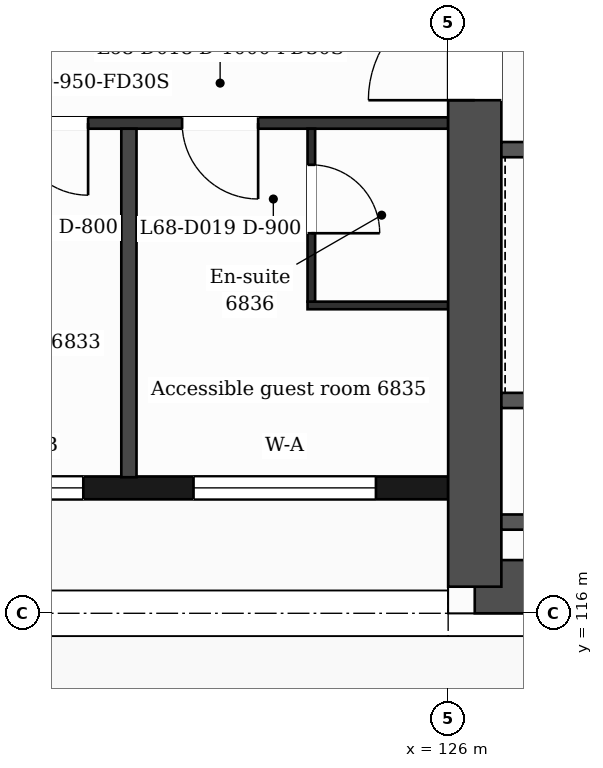
"""IFC4 building model, lengths in metres.
Left out: names, types, materials, properties, quantities, classifications, styles, units other than length and angle.
Written with IfcOpenShell. Run it as: python <this file> out.ifc"""

import sys

from ifc_helpers import new_model, si_unit, direction, frame, frame_2d, origin, place, context, subcontext, project, spatial, rectangle, extrude, element, fill, save


model = new_model("IFC4")
c1 = context("Model", 3, precision=1e-05, world=origin(), true_north=direction((0.0, 1.0)))
c2 = subcontext(c1, "Body", "Model", "MODEL_VIEW")
j1 = project(units=[si_unit("LENGTHUNIT", "METRE"), si_unit("PLANEANGLEUNIT", "RADIAN")], contexts=[c1])
p1 = place(None, origin())
s1 = spatial("IfcSite", under=j1, at=p1, CompositionType="ELEMENT")
p2 = place(p1, origin())
s2 = spatial("IfcBuilding", under=s1, at=p2, CompositionType="ELEMENT")
p3 = place(p2, frame((0.0, 0.0, 281.2)))
s3 = spatial("IfcBuildingStorey", under=s2, at=p3, CompositionType="ELEMENT", Elevation=281.2)
p4 = place(p3, frame((139.977, 116.35, 0.0), z_axis=(0.0, 0.0, 1.0), x_axis=(-1.0, 0.0, 0.0)))
e1 = element("IfcWall", 1, at=p4, inside=s3, PredefinedType="SHEAR", context=c2, shape_type="SweptSolid", body=[
    extrude(rectangle(XDim=13.626, YDim=0.7, at=frame_2d((6.813, 0.0))), origin(), (0.0, 0.0, 1.0), 3.7),
])
p5 = place(p3, frame((126.35, 116.35, 0.0), z_axis=(0.0, 0.0, 1.0), x_axis=(0.0, 1.0, 0.0)))
e2 = element("IfcWall", 2, at=p5, inside=s3, PredefinedType="SHEAR", context=c2, shape_type="SweptSolid", body=[
    extrude(rectangle(XDim=15.7, YDim=0.7, at=frame_2d((7.85, 0.0))), origin(), (0.0, 0.0, 1.0), 3.7),
])
p6 = place(p5, frame((6.4, 0.0, 0.0)))
e3 = element("IfcOpeningElement", 3, at=p6, cuts=e2, PredefinedType="OPENING", context=c2, shape_type="SweptSolid", body=[
    extrude(rectangle(XDim=1.4, YDim=2.1, at=frame_2d((0.7, 1.05))), frame((0.0, 0.36, 0.0), z_axis=(0.0, -1.0, 0.0), x_axis=(1.0, 0.0, 0.0)), (0.0, 0.0, 1.0), 0.72),
])
p7 = place(p3, frame((117.45, 117.65, 0.0), z_axis=(0.0, 0.0, 1.0), x_axis=(1.0, 0.0, 0.0)))
e4 = element("IfcWall", 4, at=p7, inside=s3, PredefinedType="SOLIDWALL", context=c2, shape_type="SweptSolid", body=[
    extrude(rectangle(XDim=8.55, YDim=0.3, at=frame_2d((4.275, 0.0))), origin(), (0.0, 0.0, 1.0), 3.38),
])
p8 = place(p7, frame((0.75, 0.0, 0.0)))
e5 = element("IfcOpeningElement", 5, at=p8, cuts=e4, PredefinedType="OPENING", context=c2, shape_type="SweptSolid", body=[
    extrude(rectangle(XDim=1.2, YDim=2.4, at=frame_2d((0.6, 1.2))), frame((0.0, 0.16, 0.0), z_axis=(0.0, -1.0, 0.0), x_axis=(1.0, 0.0, 0.0)), (0.0, 0.0, 1.0), 0.32),
])
p9 = place(p7, frame((2.55, 0.0, 0.9)))
e6 = element("IfcOpeningElement", 6, at=p9, cuts=e4, PredefinedType="OPENING", context=c2, shape_type="SweptSolid", body=[
    extrude(rectangle(XDim=1.2, YDim=2.1, at=frame_2d((0.6, 1.05))), frame((0.0, 0.16, 0.0), z_axis=(0.0, -1.0, 0.0), x_axis=(1.0, 0.0, 0.0)), (0.0, 0.0, 1.0), 0.32),
])
p10 = place(p7, frame((5.2, 0.0, 0.9)))
e7 = element("IfcOpeningElement", 7, at=p10, cuts=e4, PredefinedType="OPENING", context=c2, shape_type="SweptSolid", body=[
    extrude(rectangle(XDim=2.4, YDim=2.1, at=frame_2d((1.2, 1.05))), frame((0.0, 0.16, 0.0), z_axis=(0.0, -1.0, 0.0), x_axis=(1.0, 0.0, 0.0)), (0.0, 0.0, 1.0), 0.32),
])
for number, where, z_axis, x_axis in (
    (8, (126.7, 117.2, 0.0), (0.0, 0.0, 1.0), (1.0, 0.0, 0.0)),
    (9, (126.7, 118.8, 0.0), (0.0, 0.0, 1.0), (1.0, 0.0, 0.0)),
):
    element("IfcWall", number, at=place(p3, frame(where, z_axis=z_axis, x_axis=x_axis)), inside=s3, PredefinedType="PARTITIONING", context=c2, shape_type="SweptSolid", body=[
        extrude(rectangle(XDim=4.873, YDim=0.2, at=frame_2d((2.437, 0.0))), origin(), (0.0, 0.0, 1.0), 3.38),
    ])
p11 = place(p3, frame((124.15, 120.05, 0.0), z_axis=(0.0, 0.0, 1.0), x_axis=(1.0, 0.0, 0.0)))
e10 = element("IfcWall", 10, at=p11, inside=s3, PredefinedType="PARTITIONING", context=c2, shape_type="SweptSolid", body=[
    extrude(rectangle(XDim=1.85, YDim=0.1, at=frame_2d((0.925, 0.0))), origin(), (0.0, 0.0, 1.0), 3.38),
])
p12 = place(p3, frame((126.7, 122.1, 0.0), z_axis=(0.0, 0.0, 1.0), x_axis=(1.0, 0.0, 0.0)))
e11 = element("IfcWall", 11, at=p12, inside=s3, PredefinedType="PARTITIONING", context=c2, shape_type="SweptSolid", body=[
    extrude(rectangle(XDim=4.873, YDim=0.2, at=frame_2d((2.437, 0.0))), origin(), (0.0, 0.0, 1.0), 3.38),
])
p13 = place(p12, frame((3.105, 0.0, 0.0)))
e12 = element("IfcOpeningElement", 12, at=p13, cuts=e11, PredefinedType="OPENING", context=c2, shape_type="SweptSolid", body=[
    extrude(rectangle(XDim=1.1, YDim=2.1, at=frame_2d((0.55, 1.05))), frame((0.0, 0.11, 0.0), z_axis=(0.0, -1.0, 0.0), x_axis=(1.0, 0.0, 0.0)), (0.0, 0.0, 1.0), 0.22),
])
p14 = place(p12, frame((0.732, 0.0, 0.0)))
e13 = element("IfcOpeningElement", 13, at=p14, cuts=e11, PredefinedType="OPENING", context=c2, shape_type="SweptSolid", body=[
    extrude(rectangle(XDim=1.1, YDim=2.1, at=frame_2d((0.55, 1.05))), frame((0.0, 0.11, 0.0), z_axis=(0.0, -1.0, 0.0), x_axis=(1.0, 0.0, 0.0)), (0.0, 0.0, 1.0), 0.22),
])
p15 = place(p3, frame((100.8, 122.45, 0.0), z_axis=(0.0, 0.0, 1.0), x_axis=(1.0, 0.0, 0.0)))
e14 = element("IfcWall", 14, at=p15, inside=s3, PredefinedType="PARTITIONING", context=c2, shape_type="SweptSolid", body=[
    extrude(rectangle(XDim=25.2, YDim=0.15, at=frame_2d((12.6, 0.0))), origin(), (0.0, 0.0, 1.0), 3.38),
])
p16 = place(p15, frame((0.55, 0.0, 0.0)))
e15 = element("IfcOpeningElement", 15, at=p16, cuts=e14, PredefinedType="OPENING", context=c2, shape_type="SweptSolid", body=[
    extrude(rectangle(XDim=1.0, YDim=2.1, at=frame_2d((0.5, 1.05))), frame((0.0, 0.085, 0.0), z_axis=(0.0, -1.0, 0.0), x_axis=(1.0, 0.0, 0.0)), (0.0, 0.0, 1.0), 0.17),
])
p17 = place(p15, frame((9.375, 0.0, 0.0)))
e16 = element("IfcOpeningElement", 16, at=p17, cuts=e14, PredefinedType="OPENING", context=c2, shape_type="SweptSolid", body=[
    extrude(rectangle(XDim=1.0, YDim=2.1, at=frame_2d((0.5, 1.05))), frame((0.0, 0.085, 0.0), z_axis=(0.0, -1.0, 0.0), x_axis=(1.0, 0.0, 0.0)), (0.0, 0.0, 1.0), 0.17),
])
p18 = place(p15, frame((13.23, 0.0, 0.0)))
e17 = element("IfcOpeningElement", 17, at=p18, cuts=e14, PredefinedType="OPENING", context=c2, shape_type="SweptSolid", body=[
    extrude(rectangle(XDim=1.0, YDim=2.1, at=frame_2d((0.5, 1.05))), frame((0.0, 0.085, 0.0), z_axis=(0.0, -1.0, 0.0), x_axis=(1.0, 0.0, 0.0)), (0.0, 0.0, 1.0), 0.17),
])
p19 = place(p15, frame((19.513, 0.0, 0.0)))
e18 = element("IfcOpeningElement", 18, at=p19, cuts=e14, PredefinedType="OPENING", context=c2, shape_type="SweptSolid", body=[
    extrude(rectangle(XDim=0.95, YDim=2.1, at=frame_2d((0.475, 1.05))), frame((0.0, 0.085, 0.0), z_axis=(0.0, -1.0, 0.0), x_axis=(1.0, 0.0, 0.0)), (0.0, 0.0, 1.0), 0.17),
])
p20 = place(p15, frame((21.7, 0.0, 0.0)))
e19 = element("IfcOpeningElement", 19, at=p20, cuts=e14, PredefinedType="OPENING", context=c2, shape_type="SweptSolid", body=[
    extrude(rectangle(XDim=1.0, YDim=2.1, at=frame_2d((0.5, 1.05))), frame((0.0, 0.085, 0.0), z_axis=(0.0, -1.0, 0.0), x_axis=(1.0, 0.0, 0.0)), (0.0, 0.0, 1.0), 0.17),
])
p21 = place(p3, frame((121.8, 117.79, 0.0), z_axis=(0.0, 0.0, 1.0), x_axis=(0.0, 1.0, 0.0)))
e20 = element("IfcWall", 20, at=p21, inside=s3, PredefinedType="PARTITIONING", context=c2, shape_type="SweptSolid", body=[
    extrude(rectangle(XDim=4.585, YDim=0.2, at=frame_2d((2.292, 0.0))), origin(), (0.0, 0.0, 1.0), 3.38),
])
p22 = place(p3, frame((124.2, 120.1, 0.0), z_axis=(0.0, 0.0, 1.0), x_axis=(0.0, 1.0, 0.0)))
e21 = element("IfcWall", 21, at=p22, inside=s3, PredefinedType="PARTITIONING", context=c2, shape_type="SweptSolid", body=[
    extrude(rectangle(XDim=2.275, YDim=0.1, at=frame_2d((1.137, 0.0))), origin(), (0.0, 0.0, 1.0), 3.38),
])
p23 = place(p22, frame((0.9, 0.0, 0.0)))
e22 = element("IfcOpeningElement", 22, at=p23, cuts=e21, PredefinedType="OPENING", context=c2, shape_type="SweptSolid", body=[
    extrude(rectangle(XDim=0.9, YDim=2.1, at=frame_2d((0.45, 1.05))), frame((0.0, 0.06, 0.0), z_axis=(0.0, -1.0, 0.0), x_axis=(1.0, 0.0, 0.0)), (0.0, 0.0, 1.0), 0.12),
])
p24 = place(p9, origin())
e23 = element("IfcWindow", 23, at=p24, inside=s3, PartitioningType="SINGLE_PANEL", PredefinedType="WINDOW", context=c2, shape_type="SweptSolid", body=[
    extrude(rectangle(XDim=1.2, YDim=2.1, at=frame_2d((0.6, 1.05))), frame((0.0, 0.03, 0.0), z_axis=(0.0, -1.0, 0.0), x_axis=(1.0, 0.0, 0.0)), (0.0, 0.0, 1.0), 0.06),
])
fill(e6, e23)
p25 = place(p10, origin())
e24 = element("IfcWindow", 24, at=p25, inside=s3, PartitioningType="SINGLE_PANEL", PredefinedType="WINDOW", context=c2, shape_type="SweptSolid", body=[
    extrude(rectangle(XDim=2.4, YDim=2.1, at=frame_2d((1.2, 1.05))), frame((0.0, 0.03, 0.0), z_axis=(0.0, -1.0, 0.0), x_axis=(1.0, 0.0, 0.0)), (0.0, 0.0, 1.0), 0.06),
])
fill(e7, e24)
p26 = place(p19, origin())
e25 = element("IfcDoor", 25, at=p26, inside=s3, OperationType="SINGLE_SWING_RIGHT", PredefinedType="DOOR", context=c2, shape_type="SweptSolid", body=[
    extrude(rectangle(XDim=0.95, YDim=2.1, at=frame_2d((0.475, 1.05))), frame((0.0, 0.025, 0.0), z_axis=(0.0, -1.0, 0.0), x_axis=(1.0, 0.0, 0.0)), (0.0, 0.0, 1.0), 0.05),
])
fill(e18, e25)
p27 = place(p20, origin())
e26 = element("IfcDoor", 26, at=p27, inside=s3, OperationType="SINGLE_SWING_RIGHT", PredefinedType="DOOR", context=c2, shape_type="SweptSolid", body=[
    extrude(rectangle(XDim=1.0, YDim=2.1, at=frame_2d((0.5, 1.05))), frame((0.0, 0.025, 0.0), z_axis=(0.0, -1.0, 0.0), x_axis=(1.0, 0.0, 0.0)), (0.0, 0.0, 1.0), 0.05),
])
fill(e19, e26)
p28 = place(p23, origin())
e27 = element("IfcDoor", 27, at=p28, inside=s3, OperationType="SINGLE_SWING_LEFT", PredefinedType="DOOR", context=c2, shape_type="SweptSolid", body=[
    extrude(rectangle(XDim=0.9, YDim=2.1, at=frame_2d((0.45, 1.05))), frame((0.0, 0.025, 0.0), z_axis=(0.0, -1.0, 0.0), x_axis=(1.0, 0.0, 0.0)), (0.0, 0.0, 1.0), 0.05),
])
fill(e22, e27)
p29 = place(p6, origin())
e28 = element("IfcDoor", 28, at=p29, inside=s3, OperationType="SINGLE_SWING_LEFT", PredefinedType="DOOR", context=c2, shape_type="SweptSolid", body=[
    extrude(rectangle(XDim=1.4, YDim=2.1, at=frame_2d((0.7, 1.05))), frame((0.0, 0.025, 0.0), z_axis=(0.0, -1.0, 0.0), x_axis=(1.0, 0.0, 0.0)), (0.0, 0.0, 1.0), 0.05),
])
fill(e3, e28)
save(model, sys.argv[1])
